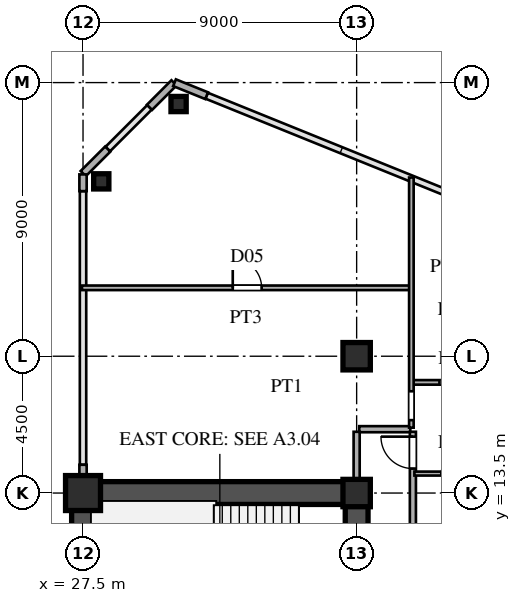
"""IFC4 building model, lengths in metres.
Left out: names, types, materials, properties, quantities, classifications, styles, units other than length and angle.
Written with IfcOpenShell. Run it as: python <this file> out.ifc"""

import sys

from ifc_helpers import new_model, si_unit, direction, frame, frame_2d, origin, origin_2d, place, context, subcontext, project, spatial, rectangle, hollow_rectangle, i_section, extrude, source, transform, mapped, element, fill, save


model = new_model("IFC4")
c1 = context("Model", 3, precision=1e-05, world=origin(), true_north=direction((0.0, 1.0)))
c2 = subcontext(c1, "Body", "Model", "MODEL_VIEW")
j1 = project(units=[si_unit("LENGTHUNIT", "METRE"), si_unit("PLANEANGLEUNIT", "RADIAN")], contexts=[c1])
p1 = place(None, origin())
s1 = spatial("IfcSite", under=j1, at=p1, CompositionType="ELEMENT")
p2 = place(p1, origin())
s2 = spatial("IfcBuilding", under=s1, at=p2, CompositionType="ELEMENT")
p3 = place(p2, frame((0.0, 0.0, 40.5)))
s3 = spatial("IfcBuildingStorey", under=s2, at=p3, CompositionType="ELEMENT", Elevation=40.5)
m1 = source(origin(), c2, "Body", "SweptSolid", [
    extrude(hollow_rectangle(XDim=1.15, YDim=1.15, WallThickness=0.048, at=origin_2d()), origin(), (0.0, 0.0, 1.0), 3.6),
])
p4 = place(p3, frame((27.5, 13.5, 0.0), z_axis=(0.0, 0.0, 1.0), x_axis=(1.0, 0.0, 0.0)))
e1 = element("IfcColumn", 1, at=p4, inside=s3, PredefinedType="COLUMN", context=c2, shape_type="MappedRepresentation", body=[
    mapped(m1, transform((0.0, 0.0, 0.0), scale=1.0)),
])
m2 = source(origin(), c2, "Body", "SweptSolid", [
    extrude(i_section(OverallWidth=0.9, OverallDepth=0.9, WebThickness=0.036, FlangeThickness=0.055, at=origin_2d()), origin(), (0.0, 0.0, 1.0), 3.6),
])
for number, where, z_axis, x_axis in (
    (2, (36.5, 13.5, 0.0), (0.0, 0.0, 1.0), (1.0, 0.0, 0.0)),
    (3, (36.5, 18.0, 0.0), (0.0, 0.0, 1.0), (1.0, 0.0, 0.0)),
):
    element("IfcColumn", number, at=place(p3, frame(where, z_axis=z_axis, x_axis=x_axis)), inside=s3, PredefinedType="COLUMN", context=c2, shape_type="MappedRepresentation", body=[
        mapped(m2, transform((0.0, 0.0, 0.0), scale=1.0)),
    ])
m3 = source(origin(), c2, "Body", "SweptSolid", [
    extrude(hollow_rectangle(XDim=0.5, YDim=0.5, WallThickness=0.02, at=origin_2d()), origin(), (0.0, 0.0, 1.0), 3.6),
])
for number, where, z_axis, x_axis in (
    (4, (30.643, 26.295, 0.0), (0.0, 0.0, 1.0), (1.0, 0.0, 0.0)),
    (5, (28.1, 23.751, 0.0), (0.0, 0.0, 1.0), (1.0, 0.0, 0.0)),
):
    element("IfcColumn", number, at=place(p3, frame(where, z_axis=z_axis, x_axis=x_axis)), inside=s3, PredefinedType="COLUMN", context=c2, shape_type="MappedRepresentation", body=[
        mapped(m3, transform((0.0, 0.0, 0.0), scale=1.0)),
    ])
p5 = place(p3, frame((31.566, 26.569, 0.0), z_axis=(0.0, 0.0, 1.0), x_axis=(-0.927007103665, 0.375043770452, 0.0)))
e6 = element("IfcWall", 6, at=p5, inside=s3, PredefinedType="SOLIDWALL", context=c2, shape_type="SweptSolid", body=[
    extrude(rectangle(XDim=1.14, YDim=0.24, at=frame_2d((0.57, 0.0))), origin(), (0.0, 0.0, 1.0), 3.38),
])
for number, where, z_axis, x_axis in (
    (7, (30.493, 26.993, 0.0), (0.0, 0.0, 1.0), (-0.707, -0.707, 0.0)),
    (8, (28.313, 24.813, 0.0), (0.0, 0.0, 1.0), (-0.707, -0.707, 0.0)),
):
    element("IfcWall", number, at=place(p3, frame(where, z_axis=z_axis, x_axis=x_axis)), inside=s3, PredefinedType="SOLIDWALL", context=c2, shape_type="SweptSolid", body=[
        extrude(rectangle(XDim=1.14, YDim=0.24, at=frame_2d((0.57, 0.0))), origin(), (0.0, 0.0, 1.0), 3.38),
    ])
p6 = place(p3, frame((27.5, 13.88, 0.0), z_axis=(0.0, 0.0, 1.0), x_axis=(0.0, 1.0, 0.0)))
e9 = element("IfcWall", 9, at=p6, inside=s3, PredefinedType="SOLIDWALL", context=c2, shape_type="SweptSolid", body=[
    extrude(rectangle(XDim=0.55, YDim=0.24, at=frame_2d((0.275, 0.0))), origin(), (0.0, 0.0, 1.0), 2.88),
])
p7 = place(p3, frame((27.5, 23.43, 0.0), z_axis=(0.0, 0.0, 1.0), x_axis=(0.0, 1.0, 0.0)))
e10 = element("IfcWall", 10, at=p7, inside=s3, PredefinedType="SOLIDWALL", context=c2, shape_type="SweptSolid", body=[
    extrude(rectangle(XDim=0.55, YDim=0.24, at=frame_2d((0.275, 0.0))), origin(), (0.0, 0.0, 1.0), 3.38),
])
p8 = place(p3, frame((27.5, 1.3, 0.0), z_axis=(0.0, 0.0, 1.0), x_axis=(0.0, 1.0, 0.0)))
e11 = element("IfcWall", 11, at=p8, inside=s3, PredefinedType="SHEAR", context=c2, shape_type="SweptSolid", body=[
    extrude(rectangle(XDim=12.2, YDim=0.75, at=frame_2d((6.1, 0.0))), origin(), (0.0, 0.0, 1.0), 3.38),
])
p9 = place(p3, frame((27.5, 13.5, 0.0), z_axis=(0.0, 0.0, 1.0), x_axis=(1.0, 0.0, 0.0)))
e12 = element("IfcWall", 12, at=p9, inside=s3, PredefinedType="SHEAR", context=c2, shape_type="SweptSolid", body=[
    extrude(rectangle(XDim=9.0, YDim=0.75, at=frame_2d((4.5, 0.0))), origin(), (0.0, 0.0, 1.0), 3.38),
])
p10 = place(p3, frame((36.5, 8.2, 0.0), z_axis=(0.0, 0.0, 1.0), x_axis=(0.0, 1.0, 0.0)))
e13 = element("IfcWall", 13, at=p10, inside=s3, PredefinedType="SHEAR", context=c2, shape_type="SweptSolid", body=[
    extrude(rectangle(XDim=5.45, YDim=0.75, at=frame_2d((2.725, 0.0))), origin(), (0.0, 0.0, 1.0), 3.38),
])
p11 = place(p10, frame((0.245, 0.0, 0.0)))
e14 = element("IfcOpeningElement", 14, at=p11, cuts=e13, PredefinedType="OPENING", context=c2, shape_type="SweptSolid", body=[
    extrude(rectangle(XDim=0.95, YDim=2.15, at=frame_2d((0.475, 1.075))), frame((0.0, 0.385, 0.0), z_axis=(0.0, -1.0, 0.0), x_axis=(1.0, 0.0, 0.0)), (0.0, 0.0, 1.0), 0.77),
])
p12 = place(p3, frame((38.4, 14.14, 0.0), z_axis=(0.0, 0.0, 1.0), x_axis=(1.0, 0.0, 0.0)))
e15 = element("IfcWall", 15, at=p12, inside=s3, PredefinedType="PARTITIONING", context=c2, shape_type="SweptSolid", body=[
    extrude(rectangle(XDim=2.65, YDim=0.13, at=frame_2d((1.325, 0.0))), origin(), (0.0, 0.0, 1.0), 3.38),
])
p13 = place(p12, frame((0.885, 0.0, 0.0)))
e16 = element("IfcOpeningElement", 16, at=p13, cuts=e15, PredefinedType="OPENING", context=c2, shape_type="SweptSolid", body=[
    extrude(rectangle(XDim=0.88, YDim=2.1, at=frame_2d((0.44, 1.05))), frame((0.0, 0.075, 0.0), z_axis=(0.0, -1.0, 0.0), x_axis=(1.0, 0.0, 0.0)), (0.0, 0.0, 1.0), 0.15),
])
p14 = place(p3, frame((36.585, 15.6, 0.0), z_axis=(0.0, 0.0, 1.0), x_axis=(1.0, 0.0, 0.0)))
e17 = element("IfcWall", 17, at=p14, inside=s3, PredefinedType="PARTITIONING", context=c2, shape_type="SweptSolid", body=[
    extrude(rectangle(XDim=1.68, YDim=0.2, at=frame_2d((0.84, 0.0))), origin(), (0.0, 0.0, 1.0), 3.38),
])
p15 = place(p3, frame((38.35, 17.14, 0.0), z_axis=(0.0, 0.0, 1.0), x_axis=(1.0, 0.0, 0.0)))
e18 = element("IfcWall", 18, at=p15, inside=s3, PredefinedType="PARTITIONING", context=c2, shape_type="SweptSolid", body=[
    extrude(rectangle(XDim=2.7, YDim=0.15, at=frame_2d((1.35, 0.0))), origin(), (0.0, 0.0, 1.0), 3.38),
])
p16 = place(p15, frame((0.875, 0.0, 0.0)))
e19 = element("IfcOpeningElement", 19, at=p16, cuts=e18, PredefinedType="OPENING", context=c2, shape_type="SweptSolid", body=[
    extrude(rectangle(XDim=0.95, YDim=2.15, at=frame_2d((0.475, 1.075))), frame((0.0, 0.085, 0.0), z_axis=(0.0, -1.0, 0.0), x_axis=(1.0, 0.0, 0.0)), (0.0, 0.0, 1.0), 0.17),
])
p17 = place(p3, frame((27.465, 20.25, 0.0), z_axis=(0.0, 0.0, 1.0), x_axis=(1.0, 0.0, 0.0)))
e20 = element("IfcWall", 20, at=p17, inside=s3, PredefinedType="PARTITIONING", context=c2, shape_type="SweptSolid", body=[
    extrude(rectangle(XDim=10.785, YDim=0.15, at=frame_2d((5.393, 0.0))), origin(), (0.0, 0.0, 1.0), 3.38),
])
p18 = place(p17, frame((4.96, 0.0, 0.0)))
e21 = element("IfcOpeningElement", 21, at=p18, cuts=e20, PredefinedType="OPENING", context=c2, shape_type="SweptSolid", body=[
    extrude(rectangle(XDim=0.95, YDim=2.15, at=frame_2d((0.475, 1.075))), frame((0.0, 0.085, 0.0), z_axis=(0.0, -1.0, 0.0), x_axis=(1.0, 0.0, 0.0)), (0.0, 0.0, 1.0), 0.17),
])
p19 = place(p3, frame((36.5, 13.88, 0.0), z_axis=(0.0, 0.0, 1.0), x_axis=(0.0, 1.0, 0.0)))
e22 = element("IfcWall", 22, at=p19, inside=s3, PredefinedType="PARTITIONING", context=c2, shape_type="SweptSolid", body=[
    extrude(rectangle(XDim=1.635, YDim=0.2, at=frame_2d((0.817, 0.0))), origin(), (0.0, 0.0, 1.0), 2.68),
])
p20 = place(p3, frame((38.3, 15.65, 0.0), z_axis=(0.0, 0.0, 1.0), x_axis=(0.0, 1.0, 0.0)))
e23 = element("IfcWall", 23, at=p20, inside=s3, PredefinedType="PARTITIONING", context=c2, shape_type="SweptSolid", body=[
    extrude(rectangle(XDim=8.228, YDim=0.15, at=frame_2d((4.114, 0.0))), origin(), (0.0, 0.0, 1.0), 3.38),
])
p21 = place(p20, frame((0.248, 0.0, 0.0)))
e24 = element("IfcOpeningElement", 24, at=p21, cuts=e23, PredefinedType="OPENING", context=c2, shape_type="SweptSolid", body=[
    extrude(rectangle(XDim=0.95, YDim=2.15, at=frame_2d((0.475, 1.075))), frame((0.0, 0.085, 0.0), z_axis=(0.0, -1.0, 0.0), x_axis=(1.0, 0.0, 0.0)), (0.0, 0.0, 1.0), 0.17),
])
p22 = place(p3, frame((38.35, -15.515, 0.0), z_axis=(0.0, 0.0, 1.0), x_axis=(0.0, 1.0, 0.0)))
e25 = element("IfcWall", 25, at=p22, inside=s3, PredefinedType="PARTITIONING", context=c2, shape_type="SweptSolid", body=[
    extrude(rectangle(XDim=31.03, YDim=0.2, at=frame_2d((15.515, 0.0))), origin(), (0.0, 0.0, 1.0), 3.38),
])
p23 = place(p22, frame((0.16, 0.0, 0.0)))
e26 = element("IfcOpeningElement", 26, at=p23, cuts=e25, PredefinedType="OPENING", context=c2, shape_type="SweptSolid", body=[
    extrude(rectangle(XDim=1.05, YDim=2.25, at=frame_2d((0.525, 1.125))), frame((0.0, 0.11, 0.0), z_axis=(0.0, -1.0, 0.0), x_axis=(1.0, 0.0, 0.0)), (0.0, 0.0, 1.0), 0.22),
])
p24 = place(p22, frame((9.067, 0.0, 0.0)))
e27 = element("IfcOpeningElement", 27, at=p24, cuts=e25, PredefinedType="OPENING", context=c2, shape_type="SweptSolid", body=[
    extrude(rectangle(XDim=1.05, YDim=2.25, at=frame_2d((0.525, 1.125))), frame((0.0, 0.11, 0.0), z_axis=(0.0, -1.0, 0.0), x_axis=(1.0, 0.0, 0.0)), (0.0, 0.0, 1.0), 0.22),
])
p25 = place(p22, frame((20.567, 0.0, 0.0)))
e28 = element("IfcOpeningElement", 28, at=p25, cuts=e25, PredefinedType="OPENING", context=c2, shape_type="SweptSolid", body=[
    extrude(rectangle(XDim=1.05, YDim=2.25, at=frame_2d((0.525, 1.125))), frame((0.0, 0.11, 0.0), z_axis=(0.0, -1.0, 0.0), x_axis=(1.0, 0.0, 0.0)), (0.0, 0.0, 1.0), 0.22),
])
p26 = place(p22, frame((29.82, 0.0, 0.0)))
e29 = element("IfcOpeningElement", 29, at=p26, cuts=e25, PredefinedType="OPENING", context=c2, shape_type="SweptSolid", body=[
    extrude(rectangle(XDim=1.05, YDim=2.25, at=frame_2d((0.525, 1.125))), frame((0.0, 0.11, 0.0), z_axis=(0.0, -1.0, 0.0), x_axis=(1.0, 0.0, 0.0)), (0.0, 0.0, 1.0), 0.22),
])
m4 = source(origin(), c2, "Body", "SweptSolid", [
    extrude(rectangle(XDim=0.88, YDim=2.1, at=frame_2d((0.44, 1.05))), frame((0.0, 0.025, 0.0), z_axis=(0.0, -1.0, 0.0), x_axis=(1.0, 0.0, 0.0)), (0.0, 0.0, 1.0), 0.05),
])
p27 = place(p13, origin())
e30 = element("IfcDoor", 30, at=p27, inside=s3, OperationType="SINGLE_SWING_RIGHT", PredefinedType="DOOR", context=c2, shape_type="MappedRepresentation", body=[
    mapped(m4, transform((0.0, 0.0, 0.0), scale=1.0)),
])
fill(e16, e30)
m5 = source(origin(), c2, "Body", "SweptSolid", [
    extrude(rectangle(XDim=0.95, YDim=2.15, at=frame_2d((0.475, 1.075))), frame((0.0, 0.025, 0.0), z_axis=(0.0, -1.0, 0.0), x_axis=(1.0, 0.0, 0.0)), (0.0, 0.0, 1.0), 0.05),
])
p28 = place(p18, origin())
e31 = element("IfcDoor", 31, at=p28, inside=s3, OperationType="SINGLE_SWING_LEFT", PredefinedType="DOOR", context=c2, shape_type="MappedRepresentation", body=[
    mapped(m5, transform((0.0, 0.0, 0.0), scale=1.0)),
])
fill(e21, e31)
m6 = source(origin(), c2, "Body", "SweptSolid", [
    extrude(rectangle(XDim=1.05, YDim=2.25, at=frame_2d((0.525, 1.125))), frame((0.0, 0.025, 0.0), z_axis=(0.0, -1.0, 0.0), x_axis=(1.0, 0.0, 0.0)), (0.0, 0.0, 1.0), 0.05),
])
p29 = place(p26, origin())
e32 = element("IfcDoor", 32, at=p29, inside=s3, OperationType="SINGLE_SWING_RIGHT", PredefinedType="DOOR", context=c2, shape_type="MappedRepresentation", body=[
    mapped(m6, transform((0.0, 0.0, 0.0), scale=1.0)),
])
fill(e29, e32)
save(model, sys.argv[1])
